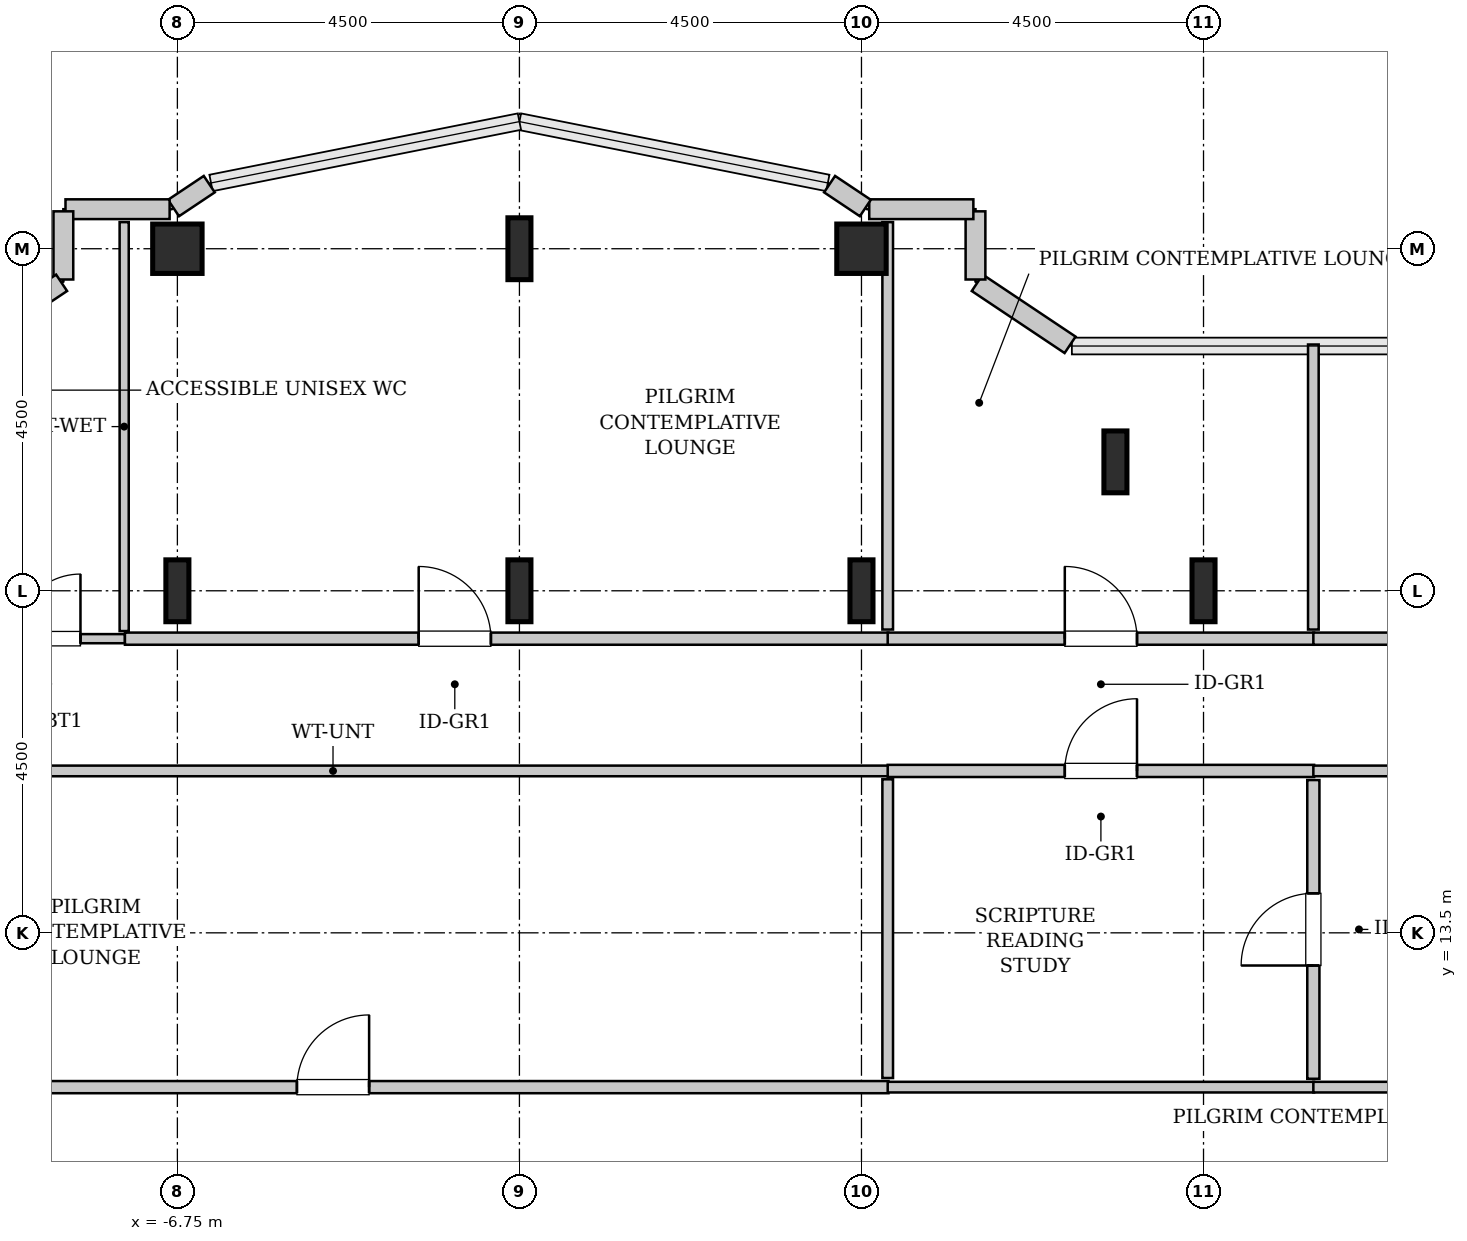
"""IFC4 building model, lengths in metres.
Left out: names, types, materials, properties, quantities, classifications, styles, units other than length and angle.
Written with IfcOpenShell. Run it as: python <this file> out.ifc"""

import sys

from ifc_helpers import new_model, si_unit, direction, frame, frame_2d, origin, origin_2d, place, context, subcontext, project, spatial, rectangle, hollow_rectangle, i_section, extrude, source, transform, mapped, element, fill, save


model = new_model("IFC4")
c1 = context("Model", 3, precision=1e-05, world=origin(), true_north=direction((0.0, 1.0)))
c2 = subcontext(c1, "Body", "Model", "MODEL_VIEW")
j1 = project(units=[si_unit("LENGTHUNIT", "METRE"), si_unit("PLANEANGLEUNIT", "RADIAN")], contexts=[c1])
p1 = place(None, origin())
s1 = spatial("IfcSite", under=j1, at=p1, CompositionType="ELEMENT")
p2 = place(p1, origin())
s2 = spatial("IfcBuilding", under=s1, at=p2, CompositionType="ELEMENT")
p3 = place(p2, frame((0.0, 0.0, 214.2)))
s3 = spatial("IfcBuildingStorey", under=s2, at=p3, CompositionType="ELEMENT", Elevation=214.2)
m1 = source(origin(), c2, "Body", "SweptSolid", [
    extrude(i_section(OverallWidth=0.303, OverallDepth=0.814, WebThickness=0.021, FlangeThickness=0.04, FilletRadius=0.03, at=origin_2d()), origin(), (0.0, 0.0, 1.0), 3.8),
])
p4 = place(p3, frame((-6.75, 18.0, 0.0), z_axis=(0.0, 0.0, 1.0), x_axis=(1.0, 0.0, 0.0)))
e1 = element("IfcColumn", 1, at=p4, inside=s3, PredefinedType="COLUMN", context=c2, shape_type="MappedRepresentation", body=[
    mapped(m1, transform((0.0, 0.0, 0.0), x_axis=(1.0, 0.0, 0.0), y_axis=(0.0, 1.0, 0.0), z_axis=(0.0, 0.0, 1.0), scale=1.0)),
])
m2 = source(origin(), c2, "Body", "SweptSolid", [
    extrude(hollow_rectangle(XDim=0.65, YDim=0.65, WallThickness=0.032, InnerFilletRadius=0.032, OuterFilletRadius=0.064, at=origin_2d()), origin(), (0.0, 0.0, 1.0), 3.8),
])
p5 = place(p3, frame((-6.75, 22.5, 0.0), z_axis=(0.0, 0.0, 1.0), x_axis=(1.0, 0.0, 0.0)))
e2 = element("IfcColumn", 2, at=p5, inside=s3, PredefinedType="COLUMN", context=c2, shape_type="MappedRepresentation", body=[
    mapped(m2, transform((0.0, 0.0, 0.0), x_axis=(1.0, 0.0, 0.0), y_axis=(0.0, 1.0, 0.0), z_axis=(0.0, 0.0, 1.0), scale=1.0)),
])
for number, where, z_axis, x_axis in (
    (3, (-2.25, 18.0, 0.0), (0.0, 0.0, 1.0), (1.0, 0.0, 0.0)),
    (4, (-2.25, 22.5, 0.0), (0.0, 0.0, 1.0), (1.0, 0.0, 0.0)),
    (5, (2.25, 18.0, 0.0), (0.0, 0.0, 1.0), (1.0, 0.0, 0.0)),
):
    element("IfcColumn", number, at=place(p3, frame(where, z_axis=z_axis, x_axis=x_axis)), inside=s3, PredefinedType="COLUMN", context=c2, shape_type="MappedRepresentation", body=[
        mapped(m1, transform((0.0, 0.0, 0.0), x_axis=(1.0, 0.0, 0.0), y_axis=(0.0, 1.0, 0.0), z_axis=(0.0, 0.0, 1.0), scale=1.0)),
    ])
p6 = place(p3, frame((2.25, 22.5, 0.0), z_axis=(0.0, 0.0, 1.0), x_axis=(1.0, 0.0, 0.0)))
e6 = element("IfcColumn", 6, at=p6, inside=s3, PredefinedType="COLUMN", context=c2, shape_type="MappedRepresentation", body=[
    mapped(m2, transform((0.0, 0.0, 0.0), x_axis=(1.0, 0.0, 0.0), y_axis=(0.0, 1.0, 0.0), z_axis=(0.0, 0.0, 1.0), scale=1.0)),
])
for number, where, z_axis, x_axis in (
    (7, (5.591, 19.696, 0.0), (0.0, 0.0, 1.0), (1.0, 0.0, 0.0)),
    (8, (6.75, 18.0, 0.0), (0.0, 0.0, 1.0), (1.0, 0.0, 0.0)),
):
    element("IfcColumn", number, at=place(p3, frame(where, z_axis=z_axis, x_axis=x_axis)), inside=s3, PredefinedType="COLUMN", context=c2, shape_type="MappedRepresentation", body=[
        mapped(m1, transform((0.0, 0.0, 0.0), x_axis=(1.0, 0.0, 0.0), y_axis=(0.0, 1.0, 0.0), z_axis=(0.0, 0.0, 1.0), scale=1.0)),
    ])
m3 = source(origin(), c2, "Body", "SweptSolid", [
    extrude(rectangle(XDim=1.469, YDim=0.26, at=frame_2d((0.734, 0.0))), origin(), (0.0, 0.0, 1.0), 3.55),
])
p7 = place(p3, frame((4.995, 21.236, 0.0), z_axis=(0.0, 0.0, 1.0), x_axis=(-0.831461760506, 0.555581983884, 0.0)))
e9 = element("IfcWall", 9, at=p7, inside=s3, PredefinedType="SOLIDWALL", context=c2, shape_type="MappedRepresentation", body=[
    mapped(m3, transform((0.0, 0.0, 0.0), x_axis=(1.0, 0.0, 0.0), y_axis=(0.0, 1.0, 0.0), z_axis=(0.0, 0.0, 1.0), scale=1.0)),
])
m4 = source(origin(), c2, "Body", "SweptSolid", [
    extrude(rectangle(XDim=0.897, YDim=0.26, at=frame_2d((0.448, 0.0))), origin(), (0.0, 0.0, 1.0), 3.55),
])
p8 = place(p3, frame((3.75, 22.095, 0.0), z_axis=(0.0, 0.0, 1.0), x_axis=(0.0, 1.0, 0.0)))
e10 = element("IfcWall", 10, at=p8, inside=s3, PredefinedType="SOLIDWALL", context=c2, shape_type="MappedRepresentation", body=[
    mapped(m4, transform((0.0, 0.0, 0.0), x_axis=(1.0, 0.0, 0.0), y_axis=(0.0, 1.0, 0.0), z_axis=(0.0, 0.0, 1.0), scale=1.0)),
])
m5 = source(origin(), c2, "Body", "SweptSolid", [
    extrude(rectangle(XDim=1.37, YDim=0.26, at=frame_2d((0.685, 0.0))), origin(), (0.0, 0.0, 1.0), 3.55),
])
p9 = place(p3, frame((3.722, 23.02, 0.0), z_axis=(0.0, 0.0, 1.0), x_axis=(-1.0, 0.0, 0.0)))
e11 = element("IfcWall", 11, at=p9, inside=s3, PredefinedType="SOLIDWALL", context=c2, shape_type="MappedRepresentation", body=[
    mapped(m5, transform((0.0, 0.0, 0.0), x_axis=(1.0, 0.0, 0.0), y_axis=(0.0, 1.0, 0.0), z_axis=(0.0, 0.0, 1.0), scale=1.0)),
])
m6 = source(origin(), c2, "Body", "SweptSolid", [
    extrude(rectangle(XDim=0.565, YDim=0.26, at=frame_2d((0.283, 0.0))), origin(), (0.0, 0.0, 1.0), 3.55),
])
for number, where, z_axis, x_axis in (
    (12, (2.301, 23.036, 0.0), (0.0, 0.0, 1.0), (-0.832, 0.555, 0.0)),
    (13, (-6.331, 23.35, 0.0), (0.0, 0.0, 1.0), (-0.832, -0.555, 0.0)),
):
    element("IfcWall", number, at=place(p3, frame(where, z_axis=z_axis, x_axis=x_axis)), inside=s3, PredefinedType="SOLIDWALL", context=c2, shape_type="MappedRepresentation", body=[
        mapped(m6, transform((0.0, 0.0, 0.0), x_axis=(1.0, 0.0, 0.0), y_axis=(0.0, 1.0, 0.0), z_axis=(0.0, 0.0, 1.0), scale=1.0)),
    ])
p10 = place(p3, frame((-6.852, 23.02, 0.0), z_axis=(0.0, 0.0, 1.0), x_axis=(-1.0, 0.0, 0.0)))
e14 = element("IfcWall", 14, at=p10, inside=s3, PredefinedType="SOLIDWALL", context=c2, shape_type="MappedRepresentation", body=[
    mapped(m5, transform((0.0, 0.0, 0.0), x_axis=(1.0, 0.0, 0.0), y_axis=(0.0, 1.0, 0.0), z_axis=(0.0, 0.0, 1.0), scale=1.0)),
])
p11 = place(p3, frame((-8.25, 22.992, 0.0), z_axis=(0.0, 0.0, 1.0), x_axis=(0.0, -1.0, 0.0)))
e15 = element("IfcWall", 15, at=p11, inside=s3, PredefinedType="SOLIDWALL", context=c2, shape_type="MappedRepresentation", body=[
    mapped(m4, transform((0.0, 0.0, 0.0), x_axis=(1.0, 0.0, 0.0), y_axis=(0.0, 1.0, 0.0), z_axis=(0.0, 0.0, 1.0), scale=1.0)),
])
p12 = place(p3, frame((-8.273, 22.052, 0.0), z_axis=(0.0, 0.0, 1.0), x_axis=(-0.831461760506, -0.555581983884, 0.0)))
e16 = element("IfcWall", 16, at=p12, inside=s3, PredefinedType="SOLIDWALL", context=c2, shape_type="MappedRepresentation", body=[
    mapped(m3, transform((0.0, 0.0, 0.0), x_axis=(1.0, 0.0, 0.0), y_axis=(0.0, 1.0, 0.0), z_axis=(0.0, 0.0, 1.0), scale=1.0)),
])
m7 = source(origin(), c2, "Body", "SweptSolid", [
    extrude(rectangle(XDim=2.02, YDim=0.12, at=frame_2d((1.01, 0.0))), origin(), (0.0, 0.0, 1.0), 3.535),
])
p13 = place(p3, frame((-9.46, 17.37, 0.0), z_axis=(0.0, 0.0, 1.0), x_axis=(1.0, 0.0, 0.0)))
e17 = element("IfcWall", 17, at=p13, inside=s3, PredefinedType="PLUMBINGWALL", context=c2, shape_type="MappedRepresentation", body=[
    mapped(m7, transform((0.0, 0.0, 0.0), x_axis=(1.0, 0.0, 0.0), y_axis=(0.0, 1.0, 0.0), z_axis=(0.0, 0.0, 1.0), scale=1.0)),
])
p14 = place(p13, frame((0.585, 0.0, 0.0)))
e18 = element("IfcOpeningElement", 18, at=p14, cuts=e17, PredefinedType="OPENING", context=c2, shape_type="SweptSolid", body=[
    extrude(rectangle(XDim=0.85, YDim=2.1, at=frame_2d((0.425, 1.05))), frame((0.0, 0.07, 0.0), z_axis=(0.0, -1.0, 0.0), x_axis=(1.0, 0.0, 0.0)), (0.0, 0.0, 1.0), 0.14),
])
m8 = source(origin(), c2, "Body", "SweptSolid", [
    extrude(rectangle(XDim=5.38, YDim=0.12, at=frame_2d((2.69, 0.0))), origin(), (0.0, 0.0, 1.0), 3.535),
])
p15 = place(p3, frame((-7.45, 17.47, 0.0), z_axis=(0.0, 0.0, 1.0), x_axis=(0.0, 1.0, 0.0)))
e19 = element("IfcWall", 19, at=p15, inside=s3, PredefinedType="PLUMBINGWALL", context=c2, shape_type="MappedRepresentation", body=[
    mapped(m8, transform((0.0, 0.0, 0.0), x_axis=(1.0, 0.0, 0.0), y_axis=(0.0, 1.0, 0.0), z_axis=(0.0, 0.0, 1.0), scale=1.0)),
])
m9 = source(origin(), c2, "Body", "SweptSolid", [
    extrude(rectangle(XDim=14.615, YDim=0.16, at=frame_2d((7.308, 0.0))), origin(), (0.0, 0.0, 1.0), 3.535),
])
p16 = place(p3, frame((-12.01, 11.47, 0.0), z_axis=(0.0, 0.0, 1.0), x_axis=(1.0, 0.0, 0.0)))
e20 = element("IfcWall", 20, at=p16, inside=s3, PredefinedType="PARTITIONING", context=c2, shape_type="MappedRepresentation", body=[
    mapped(m9, transform((0.0, 0.0, 0.0), x_axis=(1.0, 0.0, 0.0), y_axis=(0.0, 1.0, 0.0), z_axis=(0.0, 0.0, 1.0), scale=1.0)),
])
p17 = place(p16, frame((6.833, 0.0, 0.0)))
e21 = element("IfcOpeningElement", 21, at=p17, cuts=e20, PredefinedType="OPENING", context=c2, shape_type="SweptSolid", body=[
    extrude(rectangle(XDim=0.95, YDim=2.1, at=frame_2d((0.475, 1.05))), frame((0.0, 0.09, 0.0), z_axis=(0.0, -1.0, 0.0), x_axis=(1.0, 0.0, 0.0)), (0.0, 0.0, 1.0), 0.18),
])
m10 = source(origin(), c2, "Body", "SweptSolid", [
    extrude(rectangle(XDim=14.615, YDim=0.14, at=frame_2d((7.308, 0.0))), origin(), (0.0, 0.0, 1.0), 3.535),
])
p18 = place(p3, frame((-12.01, 15.63, 0.0), z_axis=(0.0, 0.0, 1.0), x_axis=(1.0, 0.0, 0.0)))
e22 = element("IfcWall", 22, at=p18, inside=s3, PredefinedType="PARTITIONING", context=c2, shape_type="MappedRepresentation", body=[
    mapped(m10, transform((0.0, 0.0, 0.0), x_axis=(1.0, 0.0, 0.0), y_axis=(0.0, 1.0, 0.0), z_axis=(0.0, 0.0, 1.0), scale=1.0)),
])
m11 = source(origin(), c2, "Body", "SweptSolid", [
    extrude(rectangle(XDim=3.93, YDim=0.14, at=frame_2d((1.965, 0.0))), origin(), (0.0, 0.0, 1.0), 3.535),
])
p19 = place(p3, frame((2.595, 11.59, 0.0), z_axis=(0.0, 0.0, 1.0), x_axis=(0.0, 1.0, 0.0)))
e23 = element("IfcWall", 23, at=p19, inside=s3, PredefinedType="PARTITIONING", context=c2, shape_type="MappedRepresentation", body=[
    mapped(m11, transform((0.0, 0.0, 0.0), x_axis=(1.0, 0.0, 0.0), y_axis=(0.0, 1.0, 0.0), z_axis=(0.0, 0.0, 1.0), scale=1.0)),
])
m12 = source(origin(), c2, "Body", "SweptSolid", [
    extrude(rectangle(XDim=10.045, YDim=0.16, at=frame_2d((5.022, 0.0))), origin(), (0.0, 0.0, 1.0), 3.535),
])
p20 = place(p3, frame((-7.44, 17.37, 0.0), z_axis=(0.0, 0.0, 1.0), x_axis=(1.0, 0.0, 0.0)))
e24 = element("IfcWall", 24, at=p20, inside=s3, PredefinedType="PARTITIONING", context=c2, shape_type="MappedRepresentation", body=[
    mapped(m12, transform((0.0, 0.0, 0.0), x_axis=(1.0, 0.0, 0.0), y_axis=(0.0, 1.0, 0.0), z_axis=(0.0, 0.0, 1.0), scale=1.0)),
])
p21 = place(p20, frame((3.865, 0.0, 0.0)))
e25 = element("IfcOpeningElement", 25, at=p21, cuts=e24, PredefinedType="OPENING", context=c2, shape_type="SweptSolid", body=[
    extrude(rectangle(XDim=0.95, YDim=2.1, at=frame_2d((0.475, 1.05))), frame((0.0, 0.09, 0.0), z_axis=(0.0, -1.0, 0.0), x_axis=(1.0, 0.0, 0.0)), (0.0, 0.0, 1.0), 0.18),
])
m13 = source(origin(), c2, "Body", "SweptSolid", [
    extrude(rectangle(XDim=5.36, YDim=0.14, at=frame_2d((2.68, 0.0))), origin(), (0.0, 0.0, 1.0), 2.925),
])
p22 = place(p3, frame((2.595, 17.49, 0.0), z_axis=(0.0, 0.0, 1.0), x_axis=(0.0, 1.0, 0.0)))
e26 = element("IfcWall", 26, at=p22, inside=s3, PredefinedType="PARTITIONING", context=c2, shape_type="MappedRepresentation", body=[
    mapped(m13, transform((0.0, 0.0, 0.0), x_axis=(1.0, 0.0, 0.0), y_axis=(0.0, 1.0, 0.0), z_axis=(0.0, 0.0, 1.0), scale=1.0)),
])
m14 = source(origin(), c2, "Body", "SweptSolid", [
    extrude(rectangle(XDim=5.61, YDim=0.16, at=frame_2d((2.805, 0.0))), origin(), (0.0, 0.0, 1.0), 3.535),
])
p23 = place(p3, frame((2.595, 17.37, 0.0), z_axis=(0.0, 0.0, 1.0), x_axis=(1.0, 0.0, 0.0)))
e27 = element("IfcWall", 27, at=p23, inside=s3, PredefinedType="PARTITIONING", context=c2, shape_type="MappedRepresentation", body=[
    mapped(m14, transform((0.0, 0.0, 0.0), x_axis=(1.0, 0.0, 0.0), y_axis=(0.0, 1.0, 0.0), z_axis=(0.0, 0.0, 1.0), scale=1.0)),
])
p24 = place(p23, frame((2.33, 0.0, 0.0)))
e28 = element("IfcOpeningElement", 28, at=p24, cuts=e27, PredefinedType="OPENING", context=c2, shape_type="SweptSolid", body=[
    extrude(rectangle(XDim=0.95, YDim=2.1, at=frame_2d((0.475, 1.05))), frame((0.0, 0.09, 0.0), z_axis=(0.0, -1.0, 0.0), x_axis=(1.0, 0.0, 0.0)), (0.0, 0.0, 1.0), 0.18),
])
m15 = source(origin(), c2, "Body", "SweptSolid", [
    extrude(rectangle(XDim=3.75, YDim=0.14, at=frame_2d((1.875, 0.0))), origin(), (0.0, 0.0, 1.0), 3.535),
])
p25 = place(p3, frame((8.195, 17.49, 0.0), z_axis=(0.0, 0.0, 1.0), x_axis=(0.0, 1.0, 0.0)))
e29 = element("IfcWall", 29, at=p25, inside=s3, PredefinedType="PARTITIONING", context=c2, shape_type="MappedRepresentation", body=[
    mapped(m15, transform((0.0, 0.0, 0.0), x_axis=(1.0, 0.0, 0.0), y_axis=(0.0, 1.0, 0.0), z_axis=(0.0, 0.0, 1.0), scale=1.0)),
])
p26 = place(p3, frame((2.595, 15.63, 0.0), z_axis=(0.0, 0.0, 1.0), x_axis=(1.0, 0.0, 0.0)))
e30 = element("IfcWall", 30, at=p26, inside=s3, PredefinedType="PARTITIONING", context=c2, shape_type="MappedRepresentation", body=[
    mapped(m14, transform((0.0, 0.0, 0.0), x_axis=(1.0, 0.0, 0.0), y_axis=(0.0, 1.0, 0.0), z_axis=(0.0, 0.0, 1.0), scale=1.0)),
])
p27 = place(p26, frame((2.33, 0.0, 0.0)))
e31 = element("IfcOpeningElement", 31, at=p27, cuts=e30, PredefinedType="OPENING", context=c2, shape_type="SweptSolid", body=[
    extrude(rectangle(XDim=0.95, YDim=2.1, at=frame_2d((0.475, 1.05))), frame((0.0, 0.09, 0.0), z_axis=(0.0, -1.0, 0.0), x_axis=(1.0, 0.0, 0.0)), (0.0, 0.0, 1.0), 0.18),
])
m16 = source(origin(), c2, "Body", "SweptSolid", [
    extrude(rectangle(XDim=5.61, YDim=0.14, at=frame_2d((2.805, 0.0))), origin(), (0.0, 0.0, 1.0), 3.535),
])
p28 = place(p3, frame((2.595, 11.47, 0.0), z_axis=(0.0, 0.0, 1.0), x_axis=(1.0, 0.0, 0.0)))
e32 = element("IfcWall", 32, at=p28, inside=s3, PredefinedType="PARTITIONING", context=c2, shape_type="MappedRepresentation", body=[
    mapped(m16, transform((0.0, 0.0, 0.0), x_axis=(1.0, 0.0, 0.0), y_axis=(0.0, 1.0, 0.0), z_axis=(0.0, 0.0, 1.0), scale=1.0)),
])
m17 = source(origin(), c2, "Body", "SweptSolid", [
    extrude(rectangle(XDim=3.93, YDim=0.16, at=frame_2d((1.965, 0.0))), origin(), (0.0, 0.0, 1.0), 3.535),
])
p29 = place(p3, frame((8.195, 11.58, 0.0), z_axis=(0.0, 0.0, 1.0), x_axis=(0.0, 1.0, 0.0)))
e33 = element("IfcWall", 33, at=p29, inside=s3, PredefinedType="PARTITIONING", context=c2, shape_type="MappedRepresentation", body=[
    mapped(m17, transform((0.0, 0.0, 0.0), x_axis=(1.0, 0.0, 0.0), y_axis=(0.0, 1.0, 0.0), z_axis=(0.0, 0.0, 1.0), scale=1.0)),
])
p30 = place(p29, frame((1.49, 0.0, 0.0)))
e34 = element("IfcOpeningElement", 34, at=p30, cuts=e33, PredefinedType="OPENING", context=c2, shape_type="SweptSolid", body=[
    extrude(rectangle(XDim=0.95, YDim=2.1, at=frame_2d((0.475, 1.05))), frame((0.0, 0.09, 0.0), z_axis=(0.0, -1.0, 0.0), x_axis=(1.0, 0.0, 0.0)), (0.0, 0.0, 1.0), 0.18),
])
m18 = source(origin(), c2, "Body", "SweptSolid", [
    extrude(rectangle(XDim=5.425, YDim=0.16, at=frame_2d((2.712, 0.0))), origin(), (0.0, 0.0, 1.0), 3.535),
])
p31 = place(p3, frame((8.195, 17.37, 0.0), z_axis=(0.0, 0.0, 1.0), x_axis=(1.0, 0.0, 0.0)))
e35 = element("IfcWall", 35, at=p31, inside=s3, PredefinedType="PARTITIONING", context=c2, shape_type="MappedRepresentation", body=[
    mapped(m18, transform((0.0, 0.0, 0.0), x_axis=(1.0, 0.0, 0.0), y_axis=(0.0, 1.0, 0.0), z_axis=(0.0, 0.0, 1.0), scale=1.0)),
])
p32 = place(p31, frame((1.611, 0.0, 0.0)))
e36 = element("IfcOpeningElement", 36, at=p32, cuts=e35, PredefinedType="OPENING", context=c2, shape_type="SweptSolid", body=[
    extrude(rectangle(XDim=0.95, YDim=2.1, at=frame_2d((0.475, 1.05))), frame((0.0, 0.09, 0.0), z_axis=(0.0, -1.0, 0.0), x_axis=(1.0, 0.0, 0.0)), (0.0, 0.0, 1.0), 0.18),
])
m19 = source(origin(), c2, "Body", "SweptSolid", [
    extrude(rectangle(XDim=3.695, YDim=0.14, at=frame_2d((1.847, 0.0))), origin(), (0.0, 0.0, 1.0), 3.535),
])
for number, where, z_axis, x_axis in (
    (37, (8.195, 15.63, 0.0), (0.0, 0.0, 1.0), (1.0, 0.0, 0.0)),
    (38, (8.195, 11.47, 0.0), (0.0, 0.0, 1.0), (1.0, 0.0, 0.0)),
):
    element("IfcWall", number, at=place(p3, frame(where, z_axis=z_axis, x_axis=x_axis)), inside=s3, PredefinedType="PARTITIONING", context=c2, shape_type="MappedRepresentation", body=[
        mapped(m19, transform((0.0, 0.0, 0.0), x_axis=(1.0, 0.0, 0.0), y_axis=(0.0, 1.0, 0.0), z_axis=(0.0, 0.0, 1.0), scale=1.0)),
    ])
m20 = source(origin(), c2, "Body", "SweptSolid", [
    extrude(rectangle(XDim=0.85, YDim=2.1, at=frame_2d((0.425, 1.05))), frame((0.0, 0.025, 0.0), z_axis=(0.0, -1.0, 0.0), x_axis=(1.0, 0.0, 0.0)), (0.0, 0.0, 1.0), 0.05),
])
p33 = place(p14, origin())
e39 = element("IfcDoor", 39, at=p33, inside=s3, OperationType="SINGLE_SWING_RIGHT", PredefinedType="DOOR", context=c2, shape_type="MappedRepresentation", body=[
    mapped(m20, transform((0.0, 0.0, 0.0), x_axis=(1.0, 0.0, 0.0), y_axis=(0.0, 1.0, 0.0), z_axis=(0.0, 0.0, 1.0), scale=1.0)),
])
fill(e18, e39)
m21 = source(origin(), c2, "Body", "SweptSolid", [
    extrude(rectangle(XDim=0.95, YDim=2.1, at=frame_2d((0.475, 1.05))), frame((0.0, 0.025, 0.0), z_axis=(0.0, -1.0, 0.0), x_axis=(1.0, 0.0, 0.0)), (0.0, 0.0, 1.0), 0.05),
])
p34 = place(p17, origin())
e40 = element("IfcDoor", 40, at=p34, inside=s3, OperationType="SINGLE_SWING_RIGHT", PredefinedType="DOOR", context=c2, shape_type="MappedRepresentation", body=[
    mapped(m21, transform((0.0, 0.0, 0.0), x_axis=(1.0, 0.0, 0.0), y_axis=(0.0, 1.0, 0.0), z_axis=(0.0, 0.0, 1.0), scale=1.0)),
])
fill(e21, e40)
p35 = place(p21, origin())
e41 = element("IfcDoor", 41, at=p35, inside=s3, OperationType="SINGLE_SWING_LEFT", PredefinedType="DOOR", context=c2, shape_type="MappedRepresentation", body=[
    mapped(m21, transform((0.0, 0.0, 0.0), x_axis=(1.0, 0.0, 0.0), y_axis=(0.0, 1.0, 0.0), z_axis=(0.0, 0.0, 1.0), scale=1.0)),
])
fill(e25, e41)
p36 = place(p24, origin())
e42 = element("IfcDoor", 42, at=p36, inside=s3, OperationType="SINGLE_SWING_LEFT", PredefinedType="DOOR", context=c2, shape_type="MappedRepresentation", body=[
    mapped(m21, transform((0.0, 0.0, 0.0), x_axis=(1.0, 0.0, 0.0), y_axis=(0.0, 1.0, 0.0), z_axis=(0.0, 0.0, 1.0), scale=1.0)),
])
fill(e28, e42)
p37 = place(p27, origin())
e43 = element("IfcDoor", 43, at=p37, inside=s3, OperationType="SINGLE_SWING_RIGHT", PredefinedType="DOOR", context=c2, shape_type="MappedRepresentation", body=[
    mapped(m21, transform((0.0, 0.0, 0.0), x_axis=(1.0, 0.0, 0.0), y_axis=(0.0, 1.0, 0.0), z_axis=(0.0, 0.0, 1.0), scale=1.0)),
])
fill(e31, e43)
p38 = place(p30, origin())
e44 = element("IfcDoor", 44, at=p38, inside=s3, OperationType="SINGLE_SWING_LEFT", PredefinedType="DOOR", context=c2, shape_type="MappedRepresentation", body=[
    mapped(m21, transform((0.0, 0.0, 0.0), x_axis=(1.0, 0.0, 0.0), y_axis=(0.0, 1.0, 0.0), z_axis=(0.0, 0.0, 1.0), scale=1.0)),
])
fill(e34, e44)
save(model, sys.argv[1])
